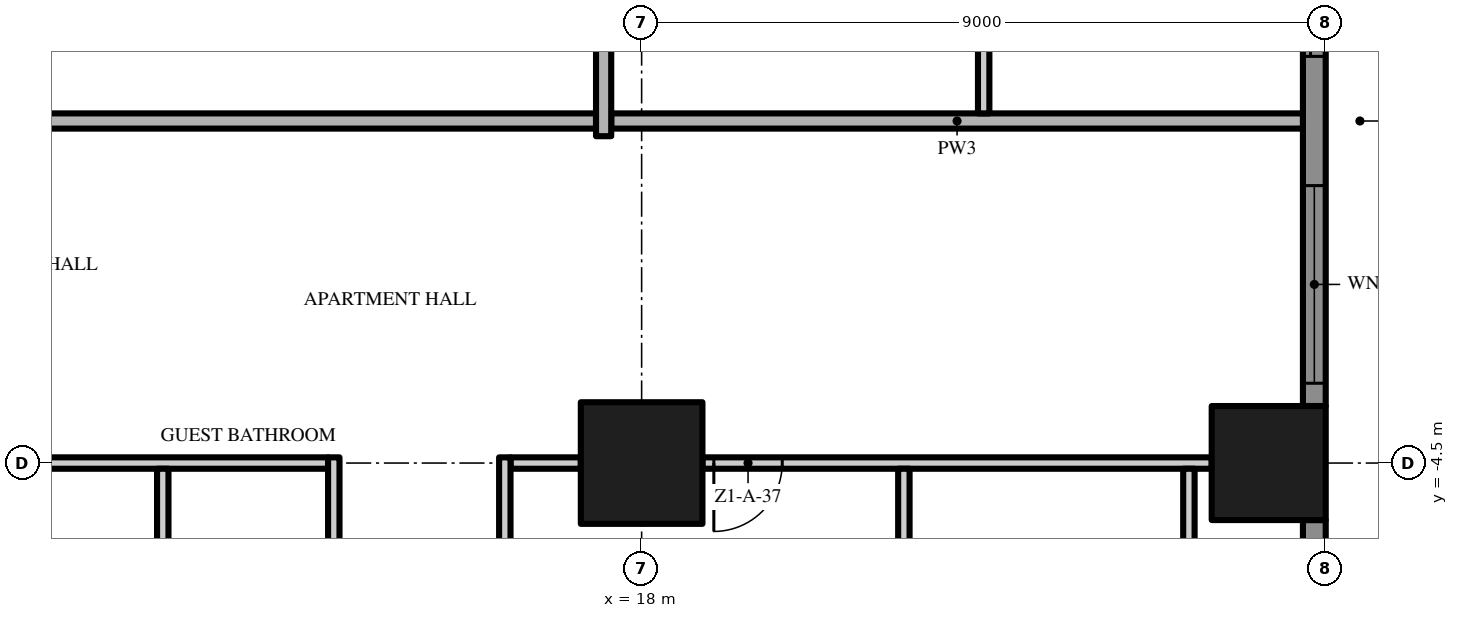
"""IFC4 building model, lengths in metres.
Left out: names, types, materials, properties, quantities, classifications, styles, units other than length and angle.
Written with IfcOpenShell. Run it as: python <this file> out.ifc"""

import sys

from ifc_helpers import new_model, si_unit, direction, frame, frame_2d, origin, origin_2d, place, context, subcontext, project, spatial, polyline, rectangle, outline, extrude, element, fill, save


model = new_model("IFC4")
c1 = context("Model", 3, precision=1e-05, world=origin(), true_north=direction((0.0, 1.0)))
c2 = subcontext(c1, "Body", "Model", "MODEL_VIEW")
j1 = project(units=[si_unit("LENGTHUNIT", "METRE"), si_unit("PLANEANGLEUNIT", "RADIAN")], contexts=[c1])
p1 = place(None, origin())
s1 = spatial("IfcSite", under=j1, at=p1, CompositionType="ELEMENT")
p2 = place(p1, origin())
s2 = spatial("IfcBuilding", under=s1, at=p2, CompositionType="ELEMENT")
p3 = place(p2, frame((0.0, 0.0, 15.0)))
s3 = spatial("IfcBuildingStorey", under=s2, at=p3, CompositionType="ELEMENT", Elevation=15.0)
p4 = place(p3, frame((18.0, -4.5, 0.0), z_axis=(0.0, 0.0, 1.0), x_axis=(1.0, 0.0, 0.0)))
e1 = element("IfcColumn", 1, at=p4, inside=s3, PredefinedType="COLUMN", context=c2, shape_type="SweptSolid", body=[
    extrude(rectangle(XDim=1.6, YDim=1.6, at=origin_2d()), origin(), (0.0, 0.0, 1.0), 3.5),
])
p5 = place(p3, frame((26.25, -4.5, 0.0), z_axis=(0.0, 0.0, 1.0), x_axis=(1.0, 0.0, 0.0)))
e2 = element("IfcColumn", 2, at=p5, inside=s3, PredefinedType="COLUMN", context=c2, shape_type="SweptSolid", body=[
    extrude(rectangle(XDim=1.5, YDim=1.5, at=origin_2d()), origin(), (0.0, 0.0, 1.0), 3.5),
])
p6 = place(p3, frame((26.85, -5.25, 0.0), z_axis=(0.0, 0.0, 1.0), x_axis=(0.0, -1.0, 0.0)))
e3 = element("IfcWall", 3, at=p6, inside=s3, PredefinedType="SOLIDWALL", context=c2, shape_type="SweptSolid", body=[
    extrude(rectangle(XDim=7.5, YDim=0.3, at=frame_2d((3.75, 0.0))), origin(), (0.0, 0.0, 1.0), 3.5),
])
p7 = place(p6, frame((4.6, 0.0, 0.45)))
e4 = element("IfcOpeningElement", 4, at=p7, cuts=e3, PredefinedType="OPENING", context=c2, shape_type="SweptSolid", body=[
    extrude(rectangle(XDim=2.6, YDim=2.65, at=frame_2d((1.3, 1.325))), frame((0.0, 0.16, 0.0), z_axis=(0.0, -1.0, 0.0), x_axis=(1.0, 0.0, 0.0)), (0.0, 0.0, 1.0), 0.32),
])
p8 = place(p6, frame((0.3, 0.0, 0.45)))
e5 = element("IfcOpeningElement", 5, at=p8, cuts=e3, PredefinedType="OPENING", context=c2, shape_type="SweptSolid", body=[
    extrude(rectangle(XDim=2.6, YDim=2.65, at=frame_2d((1.3, 1.325))), frame((0.0, 0.16, 0.0), z_axis=(0.0, -1.0, 0.0), x_axis=(1.0, 0.0, 0.0)), (0.0, 0.0, 1.0), 0.32),
])
p9 = place(p3, frame((26.85, 3.75, 0.0), z_axis=(0.0, 0.0, 1.0), x_axis=(0.0, -1.0, 0.0)))
e6 = element("IfcWall", 6, at=p9, inside=s3, PredefinedType="SOLIDWALL", context=c2, shape_type="SweptSolid", body=[
    extrude(rectangle(XDim=7.5, YDim=0.3, at=frame_2d((3.75, 0.0))), origin(), (0.0, 0.0, 1.0), 3.5),
])
p10 = place(p9, frame((4.6, 0.0, 0.45)))
e7 = element("IfcOpeningElement", 7, at=p10, cuts=e6, PredefinedType="OPENING", context=c2, shape_type="SweptSolid", body=[
    extrude(rectangle(XDim=2.6, YDim=2.65, at=frame_2d((1.3, 1.325))), frame((0.0, 0.16, 0.0), z_axis=(0.0, -1.0, 0.0), x_axis=(1.0, 0.0, 0.0)), (0.0, 0.0, 1.0), 0.32),
])
p11 = place(p9, frame((0.3, 0.0, 0.0)))
e8 = element("IfcOpeningElement", 8, at=p11, cuts=e6, PredefinedType="OPENING", context=c2, shape_type="SweptSolid", body=[
    extrude(rectangle(XDim=2.6, YDim=2.4, at=frame_2d((1.3, 1.2))), frame((0.0, 0.16, 0.0), z_axis=(0.0, -1.0, 0.0), x_axis=(1.0, 0.0, 0.0)), (0.0, 0.0, 1.0), 0.32),
])
p12 = place(p3, origin())
e9 = element("IfcWall", 9, at=p12, inside=s3, PredefinedType="USERDEFINED", context=c2, shape_type="SweptSolid", body=[
    extrude(outline(polyline([(28.8, -18.0), (29.505, -16.5), (29.941, -15.0), (30.0, -14.25), (29.941, -13.5), (29.505, -12.0), (28.8, -10.5), (28.095, -9.0), (27.659, -7.5), (27.6, -6.75), (27.659, -6.0), (28.095, -4.5), (28.8, -3.0), (29.505, -1.5), (29.941, 0.0), (30.0, 0.75), (29.941, 1.5), (29.505, 3.0), (28.8, 4.5), (28.095, 6.0), (27.659, 7.5), (27.6, 8.25), (27.659, 9.0), (28.095, 10.5), (28.8, 12.0), (29.505, 13.5), (29.941, 15.0), (30.0, 15.75), (29.941, 16.5), (29.505, 18.0), (29.265, 17.93), (29.694, 16.455), (29.749, 15.75), (29.694, 15.045), (29.271, 13.589), (28.574, 12.106), (27.86, 10.589), (27.411, 9.045), (27.349, 8.25), (27.411, 7.455), (27.86, 5.911), (28.574, 4.394), (29.271, 2.911), (29.694, 1.455), (29.749, 0.75), (29.694, 0.045), (29.271, -1.411), (28.574, -2.894), (27.86, -4.411), (27.411, -5.955), (27.349, -6.75), (27.411, -7.545), (27.86, -9.089), (28.574, -10.606), (29.271, -12.089), (29.694, -13.545), (29.749, -14.25), (29.694, -14.955), (29.271, -16.411), (28.574, -17.894), (28.8, -18.0)])), origin(), (0.0, 0.0, 1.0), 0.9),
])
p13 = place(p3, frame((9.8, -4.5, 0.0), z_axis=(0.0, 0.0, 1.0), x_axis=(1.0, 0.0, 0.0)))
e10 = element("IfcWall", 10, at=p13, inside=s3, PredefinedType="PARTITIONING", context=c2, shape_type="SweptSolid", body=[
    extrude(rectangle(XDim=4.075, YDim=0.15, at=frame_2d((2.038, 0.0))), origin(), (0.0, 0.0, 1.0), 3.5),
])
p14 = place(p3, frame((16.275, -4.5, 0.0), z_axis=(0.0, 0.0, 1.0), x_axis=(1.0, 0.0, 0.0)))
e11 = element("IfcWall", 11, at=p14, inside=s3, PredefinedType="PARTITIONING", context=c2, shape_type="SweptSolid", body=[
    extrude(rectangle(XDim=0.925, YDim=0.15, at=frame_2d((0.463, 0.0))), origin(), (0.0, 0.0, 1.0), 3.5),
])
p15 = place(p3, frame((25.5, -4.5, 0.0), z_axis=(0.0, 0.0, 1.0), x_axis=(-1.0, 0.0, 0.0)))
e12 = element("IfcWall", 12, at=p15, inside=s3, PredefinedType="PARTITIONING", context=c2, shape_type="SweptSolid", body=[
    extrude(rectangle(XDim=6.7, YDim=0.15, at=frame_2d((3.35, 0.0))), origin(), (0.0, 0.0, 1.0), 3.5),
])
p16 = place(p15, frame((5.65, 0.0, 0.0)))
e13 = element("IfcOpeningElement", 13, at=p16, cuts=e12, PredefinedType="OPENING", context=c2, shape_type="SweptSolid", body=[
    extrude(rectangle(XDim=0.9, YDim=2.1, at=frame_2d((0.45, 1.05))), frame((0.0, 0.085, 0.0), z_axis=(0.0, -1.0, 0.0), x_axis=(1.0, 0.0, 0.0)), (0.0, 0.0, 1.0), 0.17),
])
p17 = place(p3, frame((17.4, 0.0, 0.0), z_axis=(0.0, 0.0, 1.0), x_axis=(-1.0, 0.0, 0.0)))
e14 = element("IfcWall", 14, at=p17, inside=s3, PredefinedType="PARTITIONING", context=c2, shape_type="SweptSolid", body=[
    extrude(rectangle(XDim=17.3, YDim=0.2, at=frame_2d((8.65, 0.0))), origin(), (0.0, 0.0, 1.0), 3.5),
])
p18 = place(p17, frame((7.65, 0.0, 0.0)))
e15 = element("IfcOpeningElement", 15, at=p18, cuts=e14, PredefinedType="OPENING", context=c2, shape_type="SweptSolid", body=[
    extrude(rectangle(XDim=1.5, YDim=2.4, at=frame_2d((0.75, 1.2))), frame((0.0, 0.11, 0.0), z_axis=(0.0, -1.0, 0.0), x_axis=(1.0, 0.0, 0.0)), (0.0, 0.0, 1.0), 0.22),
])
p19 = place(p3, frame((17.6, 0.0, 0.0), z_axis=(0.0, 0.0, 1.0), x_axis=(1.0, 0.0, 0.0)))
e16 = element("IfcWall", 16, at=p19, inside=s3, PredefinedType="PARTITIONING", context=c2, shape_type="SweptSolid", body=[
    extrude(rectangle(XDim=9.1, YDim=0.2, at=frame_2d((4.55, 0.0))), origin(), (0.0, 0.0, 1.0), 3.5),
])
p20 = place(p3, frame((11.7, -8.925, 0.0), z_axis=(0.0, 0.0, 1.0), x_axis=(0.0, 1.0, 0.0)))
e17 = element("IfcWall", 17, at=p20, inside=s3, PredefinedType="PARTITIONING", context=c2, shape_type="SweptSolid", body=[
    extrude(rectangle(XDim=4.35, YDim=0.15, at=frame_2d((2.175, 0.0))), origin(), (0.0, 0.0, 1.0), 3.5),
])
p21 = place(p3, frame((13.95, -9.075, 0.0), z_axis=(0.0, 0.0, 1.0), x_axis=(0.0, 1.0, 0.0)))
e18 = element("IfcWall", 18, at=p21, inside=s3, PredefinedType="PARTITIONING", context=c2, shape_type="SweptSolid", body=[
    extrude(rectangle(XDim=4.65, YDim=0.15, at=frame_2d((2.325, 0.0))), origin(), (0.0, 0.0, 1.0), 3.5),
])
p22 = place(p21, frame((1.875, 0.0, 0.0)))
e19 = element("IfcOpeningElement", 19, at=p22, cuts=e18, PredefinedType="OPENING", context=c2, shape_type="SweptSolid", body=[
    extrude(rectangle(XDim=0.9, YDim=2.1, at=frame_2d((0.45, 1.05))), frame((0.0, 0.085, 0.0), z_axis=(0.0, -1.0, 0.0), x_axis=(1.0, 0.0, 0.0)), (0.0, 0.0, 1.0), 0.17),
])
p23 = place(p3, frame((16.2, -9.075, 0.0), z_axis=(0.0, 0.0, 1.0), x_axis=(0.0, 1.0, 0.0)))
e20 = element("IfcWall", 20, at=p23, inside=s3, PredefinedType="PARTITIONING", context=c2, shape_type="SweptSolid", body=[
    extrude(rectangle(XDim=4.65, YDim=0.15, at=frame_2d((2.325, 0.0))), origin(), (0.0, 0.0, 1.0), 3.5),
])
p24 = place(p3, frame((17.5, -0.2, 0.0), z_axis=(0.0, 0.0, 1.0), x_axis=(0.0, 1.0, 0.0)))
e21 = element("IfcWall", 21, at=p24, inside=s3, PredefinedType="PARTITIONING", context=c2, shape_type="SweptSolid", body=[
    extrude(rectangle(XDim=3.9, YDim=0.2, at=frame_2d((1.95, 0.0))), origin(), (0.0, 0.0, 1.0), 3.5),
])
p25 = place(p3, frame((21.45, -4.575, 0.0), z_axis=(0.0, 0.0, 1.0), x_axis=(0.0, -1.0, 0.0)))
e22 = element("IfcWall", 22, at=p25, inside=s3, PredefinedType="PARTITIONING", context=c2, shape_type="SweptSolid", body=[
    extrude(rectangle(XDim=4.35, YDim=0.15, at=frame_2d((2.175, 0.0))), origin(), (0.0, 0.0, 1.0), 3.5),
])
p26 = place(p25, frame((1.7, 0.0, 0.0)))
e23 = element("IfcOpeningElement", 23, at=p26, cuts=e22, PredefinedType="OPENING", context=c2, shape_type="SweptSolid", body=[
    extrude(rectangle(XDim=0.9, YDim=2.1, at=frame_2d((0.45, 1.05))), frame((0.0, 0.085, 0.0), z_axis=(0.0, -1.0, 0.0), x_axis=(1.0, 0.0, 0.0)), (0.0, 0.0, 1.0), 0.17),
])
p27 = place(p3, frame((22.5, 17.25, 0.0), z_axis=(0.0, 0.0, 1.0), x_axis=(0.0, -1.0, 0.0)))
e24 = element("IfcWall", 24, at=p27, inside=s3, PredefinedType="PARTITIONING", context=c2, shape_type="SweptSolid", body=[
    extrude(rectangle(XDim=17.15, YDim=0.15, at=frame_2d((8.575, 0.0))), origin(), (0.0, 0.0, 1.0), 3.5),
])
p28 = place(p27, frame((14.5, 0.0, 0.0)))
e25 = element("IfcOpeningElement", 25, at=p28, cuts=e24, PredefinedType="OPENING", context=c2, shape_type="SweptSolid", body=[
    extrude(rectangle(XDim=1.0, YDim=2.4, at=frame_2d((0.5, 1.2))), frame((0.0, 0.085, 0.0), z_axis=(0.0, -1.0, 0.0), x_axis=(1.0, 0.0, 0.0)), (0.0, 0.0, 1.0), 0.17),
])
p29 = place(p27, frame((8.9, 0.0, 0.0)))
e26 = element("IfcOpeningElement", 26, at=p29, cuts=e24, PredefinedType="OPENING", context=c2, shape_type="SweptSolid", body=[
    extrude(rectangle(XDim=1.0, YDim=2.4, at=frame_2d((0.5, 1.2))), frame((0.0, 0.085, 0.0), z_axis=(0.0, -1.0, 0.0), x_axis=(1.0, 0.0, 0.0)), (0.0, 0.0, 1.0), 0.17),
])
p30 = place(p27, frame((6.65, 0.0, 0.0)))
e27 = element("IfcOpeningElement", 27, at=p30, cuts=e24, PredefinedType="OPENING", context=c2, shape_type="SweptSolid", body=[
    extrude(rectangle(XDim=1.0, YDim=2.4, at=frame_2d((0.5, 1.2))), frame((0.0, 0.085, 0.0), z_axis=(0.0, -1.0, 0.0), x_axis=(1.0, 0.0, 0.0)), (0.0, 0.0, 1.0), 0.17),
])
p31 = place(p27, frame((0.15, 0.0, 0.0)))
e28 = element("IfcOpeningElement", 28, at=p31, cuts=e24, PredefinedType="OPENING", context=c2, shape_type="SweptSolid", body=[
    extrude(rectangle(XDim=1.0, YDim=2.4, at=frame_2d((0.5, 1.2))), frame((0.0, 0.085, 0.0), z_axis=(0.0, -1.0, 0.0), x_axis=(1.0, 0.0, 0.0)), (0.0, 0.0, 1.0), 0.17),
])
p32 = place(p3, frame((25.2, -8.925, 0.0), z_axis=(0.0, 0.0, 1.0), x_axis=(0.0, 1.0, 0.0)))
e29 = element("IfcWall", 29, at=p32, inside=s3, PredefinedType="PARTITIONING", context=c2, shape_type="SweptSolid", body=[
    extrude(rectangle(XDim=4.35, YDim=0.15, at=frame_2d((2.175, 0.0))), origin(), (0.0, 0.0, 1.0), 3.5),
])
p33 = place(p10, origin())
e30 = element("IfcWindow", 30, at=p33, inside=s3, PartitioningType="SINGLE_PANEL", PredefinedType="WINDOW", context=c2, shape_type="SweptSolid", body=[
    extrude(rectangle(XDim=2.6, YDim=2.65, at=frame_2d((1.3, 1.325))), frame((0.0, 0.03, 0.0), z_axis=(0.0, -1.0, 0.0), x_axis=(1.0, 0.0, 0.0)), (0.0, 0.0, 1.0), 0.06),
])
fill(e7, e30)
p34 = place(p11, origin())
e31 = element("IfcDoor", 31, at=p34, inside=s3, OperationType="SINGLE_SWING_LEFT", PredefinedType="DOOR", context=c2, shape_type="SweptSolid", body=[
    extrude(rectangle(XDim=2.6, YDim=2.4, at=frame_2d((1.3, 1.2))), frame((0.0, 0.025, 0.0), z_axis=(0.0, -1.0, 0.0), x_axis=(1.0, 0.0, 0.0)), (0.0, 0.0, 1.0), 0.05),
])
fill(e8, e31)
p35 = place(p16, origin())
e32 = element("IfcDoor", 32, at=p35, inside=s3, OperationType="SINGLE_SWING_RIGHT", PredefinedType="DOOR", context=c2, shape_type="SweptSolid", body=[
    extrude(rectangle(XDim=0.9, YDim=2.1, at=frame_2d((0.45, 1.05))), frame((0.0, 0.025, 0.0), z_axis=(0.0, -1.0, 0.0), x_axis=(1.0, 0.0, 0.0)), (0.0, 0.0, 1.0), 0.05),
])
fill(e13, e32)
save(model, sys.argv[1])
